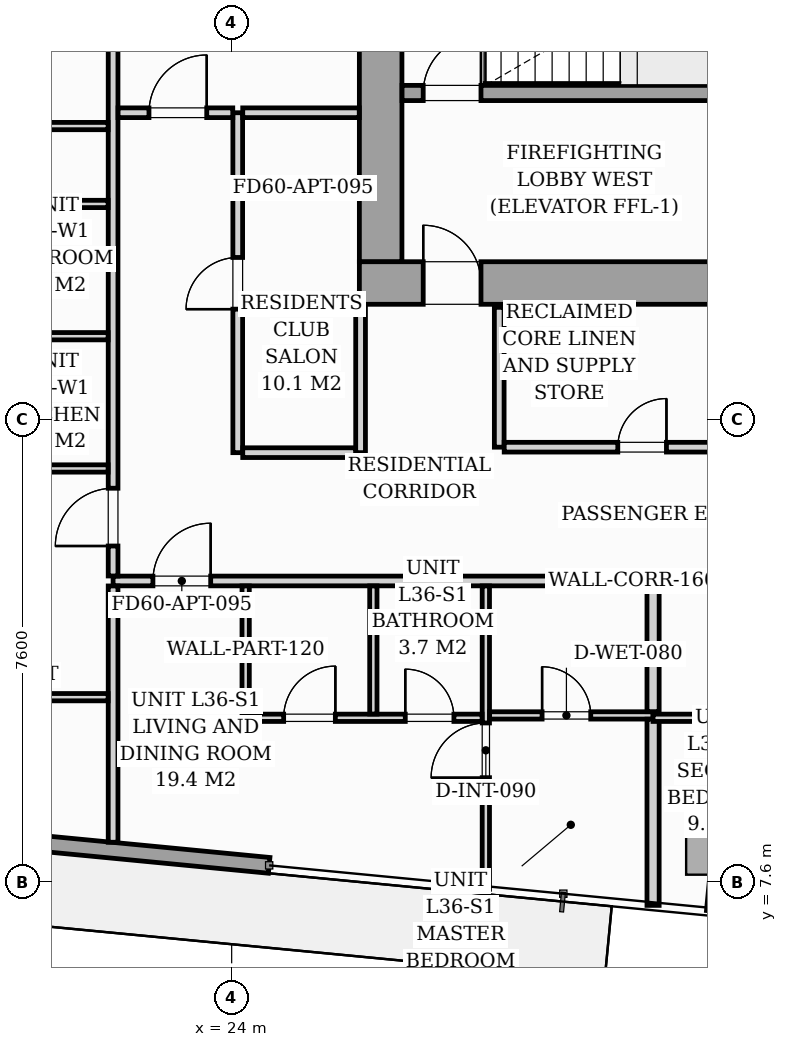
"""IFC4 building model, lengths in metres.
Left out: names, types, materials, properties, quantities, classifications, styles, units other than length and angle.
Written with IfcOpenShell. Run it as: python <this file> out.ifc"""

import sys

from ifc_helpers import new_model, si_unit, direction, frame, frame_2d, origin, origin_2d, place, context, subcontext, project, spatial, rectangle, i_section, extrude, source, transform, mapped, element, fill, save


model = new_model("IFC4")
c1 = context("Model", 3, precision=1e-05, world=origin(), true_north=direction((0.0, 1.0)))
c2 = subcontext(c1, "Body", "Model", "MODEL_VIEW")
j1 = project(units=[si_unit("LENGTHUNIT", "METRE"), si_unit("PLANEANGLEUNIT", "RADIAN")], contexts=[c1])
p1 = place(None, origin())
s1 = spatial("IfcSite", under=j1, at=p1, CompositionType="ELEMENT")
p2 = place(p1, origin())
s2 = spatial("IfcBuilding", under=s1, at=p2, CompositionType="ELEMENT")
p3 = place(p2, frame((0.0, 0.0, 127.8)))
s3 = spatial("IfcBuildingStorey", under=s2, at=p3, CompositionType="ELEMENT", Elevation=127.8)
m1 = source(origin(), c2, "Body", "SweptSolid", [
    extrude(i_section(OverallWidth=0.421, OverallDepth=0.465, WebThickness=0.045, FlangeThickness=0.073, FilletRadius=0.018, at=origin_2d()), origin(), (0.0, 0.0, 1.0), 3.196),
])
p4 = place(p3, frame((26.4, 17.4, 0.002), z_axis=(0.0, 0.0, 1.0), x_axis=(1.0, 0.0, 0.0)))
e1 = element("IfcColumn", 1, at=p4, inside=s3, PredefinedType="PILASTER", context=c2, shape_type="MappedRepresentation", body=[
    mapped(m1, transform((0.0, 0.0, 0.0), scale=1.0)),
])
m2 = source(origin(), c2, "Body", "SweptSolid", [
    extrude(rectangle(XDim=1.0, YDim=1.0, at=origin_2d()), origin(), (0.0, 0.0, 1.0), 3.196),
])
p5 = place(p3, frame((31.974, 8.22, 0.002), z_axis=(0.0, 0.0, 1.0), x_axis=(0.995396198367, -0.09584575252, 0.0)))
e2 = element("IfcColumn", 2, at=p5, inside=s3, PredefinedType="COLUMN", context=c2, shape_type="MappedRepresentation", body=[
    mapped(m2, transform((0.0, 0.0, 0.0), scale=1.0)),
])
p6 = place(p3, frame((24.617, 7.873, 0.0), z_axis=(0.0, 0.0, 1.0), x_axis=(-0.995395976631, 0.095848055311, 0.0)))
e3 = element("IfcWall", 3, at=p6, inside=s3, PredefinedType="STANDARD", context=c2, shape_type="SweptSolid", body=[
    extrude(rectangle(XDim=17.01, YDim=0.26, at=frame_2d((8.505, 0.0))), origin(), (0.0, 0.0, 1.0), 2.94),
])
p7 = place(p6, frame((6.51, 0.0, 0.0)))
e4 = element("IfcOpeningElement", 4, at=p7, cuts=e3, PredefinedType="OPENING", context=c2, shape_type="SweptSolid", body=[
    extrude(rectangle(XDim=1.8, YDim=2.06, at=frame_2d((0.9, 1.03))), frame((0.0, 0.14, 0.0), z_axis=(0.0, -1.0, 0.0), x_axis=(1.0, 0.0, 0.0)), (0.0, 0.0, 1.0), 0.28),
])
p8 = place(p6, frame((8.8, 0.0, 0.65)))
e5 = element("IfcOpeningElement", 5, at=p8, cuts=e3, PredefinedType="OPENING", context=c2, shape_type="SweptSolid", body=[
    extrude(rectangle(XDim=1.6, YDim=1.5, at=frame_2d((0.8, 0.75))), frame((0.0, 0.14, 0.0), z_axis=(0.0, -1.0, 0.0), x_axis=(1.0, 0.0, 0.0)), (0.0, 0.0, 1.0), 0.28),
])
p9 = place(p3, frame((26.1, 17.45, 0.0), z_axis=(0.0, 0.0, 1.0), x_axis=(1.0, 0.0, 0.0)))
e6 = element("IfcWall", 6, at=p9, inside=s3, PredefinedType="SHEAR", context=c2, shape_type="SweptSolid", body=[
    extrude(rectangle(XDim=19.8, YDim=0.7, at=frame_2d((9.9, 0.0))), origin(), (0.0, 0.0, 1.0), 3.2),
])
p10 = place(p9, frame((1.05, 0.0, 0.0)))
e7 = element("IfcOpeningElement", 7, at=p10, cuts=e6, PredefinedType="OPENING", context=c2, shape_type="SweptSolid", body=[
    extrude(rectangle(XDim=0.95, YDim=2.06, at=frame_2d((0.475, 1.03))), frame((0.0, 0.36, 0.0), z_axis=(0.0, -1.0, 0.0), x_axis=(1.0, 0.0, 0.0)), (0.0, 0.0, 1.0), 0.72),
])
p11 = place(p9, frame((9.48, 0.0, 0.0)))
e8 = element("IfcOpeningElement", 8, at=p11, cuts=e6, PredefinedType="OPENING", context=c2, shape_type="SweptSolid", body=[
    extrude(rectangle(XDim=0.85, YDim=2.0, at=frame_2d((0.425, 1.0))), frame((0.0, 0.36, 0.0), z_axis=(0.0, -1.0, 0.0), x_axis=(1.0, 0.0, 0.0)), (0.0, 0.0, 1.0), 0.72),
])
p12 = place(p9, frame((17.65, 0.0, 0.0)))
e9 = element("IfcOpeningElement", 9, at=p12, cuts=e6, PredefinedType="OPENING", context=c2, shape_type="SweptSolid", body=[
    extrude(rectangle(XDim=0.95, YDim=2.06, at=frame_2d((0.475, 1.03))), frame((0.0, 0.36, 0.0), z_axis=(0.0, -1.0, 0.0), x_axis=(1.0, 0.0, 0.0)), (0.0, 0.0, 1.0), 0.72),
])
p13 = place(p3, frame((26.45, 17.802, 0.0), z_axis=(0.0, 0.0, 1.0), x_axis=(0.0, 1.0, 0.0)))
e10 = element("IfcWall", 10, at=p13, inside=s3, PredefinedType="SHEAR", context=c2, shape_type="SweptSolid", body=[
    extrude(rectangle(XDim=5.796, YDim=0.7, at=frame_2d((2.898, 0.0))), origin(), (0.0, 0.0, 1.0), 3.2),
])
p14 = place(p3, frame((26.802, 20.575, 0.0), z_axis=(0.0, 0.0, 1.0), x_axis=(1.0, 0.0, 0.0)))
e11 = element("IfcWall", 11, at=p14, inside=s3, PredefinedType="SOLIDWALL", context=c2, shape_type="SweptSolid", body=[
    extrude(rectangle(XDim=8.148, YDim=0.25, at=frame_2d((4.074, 0.0))), origin(), (0.0, 0.0, 1.0), 3.2),
])
p15 = place(p14, frame((0.348, 0.0, 0.0)))
e12 = element("IfcOpeningElement", 12, at=p15, cuts=e11, PredefinedType="OPENING", context=c2, shape_type="SweptSolid", body=[
    extrude(rectangle(XDim=0.95, YDim=2.06, at=frame_2d((0.475, 1.03))), frame((0.0, 0.135, 0.0), z_axis=(0.0, -1.0, 0.0), x_axis=(1.0, 0.0, 0.0)), (0.0, 0.0, 1.0), 0.27),
])
p16 = place(p3, frame((28.4, 14.75, 0.0), z_axis=(0.0, 0.0, 1.0), x_axis=(0.0, 1.0, 0.0)))
e13 = element("IfcWall", 13, at=p16, inside=s3, PredefinedType="PARTITIONING", context=c2, shape_type="SweptSolid", body=[
    extrude(rectangle(XDim=2.3, YDim=0.16, at=frame_2d((1.15, 0.0))), origin(), (0.0, 0.0, 1.0), 2.94),
])
p17 = place(p3, frame((28.482, 14.75, 0.0), z_axis=(0.0, 0.0, 1.0), x_axis=(1.0, 0.0, 0.0)))
e14 = element("IfcWall", 14, at=p17, inside=s3, PredefinedType="PARTITIONING", context=c2, shape_type="SweptSolid", body=[
    extrude(rectangle(XDim=4.516, YDim=0.16, at=frame_2d((2.258, 0.0))), origin(), (0.0, 0.0, 1.0), 2.94),
])
p18 = place(p17, frame((1.868, 0.0, 0.0)))
e15 = element("IfcOpeningElement", 15, at=p18, cuts=e14, PredefinedType="OPENING", context=c2, shape_type="SweptSolid", body=[
    extrude(rectangle(XDim=0.8, YDim=2.05, at=frame_2d((0.4, 1.025))), frame((0.0, 0.09, 0.0), z_axis=(0.0, -1.0, 0.0), x_axis=(1.0, 0.0, 0.0)), (0.0, 0.0, 1.0), 0.18),
])
p19 = place(p3, frame((22.05, 12.55, 0.0), z_axis=(0.0, 0.0, 1.0), x_axis=(1.0, 0.0, 0.0)))
e16 = element("IfcWall", 16, at=p19, inside=s3, PredefinedType="PARTITIONING", context=c2, shape_type="SweptSolid", body=[
    extrude(rectangle(XDim=23.83, YDim=0.16, at=frame_2d((11.915, 0.0))), origin(), (0.0, 0.0, 1.0), 2.94),
])
p20 = place(p19, frame((0.655, 0.0, 0.0)))
e17 = element("IfcOpeningElement", 17, at=p20, cuts=e16, PredefinedType="OPENING", context=c2, shape_type="SweptSolid", body=[
    extrude(rectangle(XDim=0.95, YDim=2.06, at=frame_2d((0.475, 1.03))), frame((0.0, 0.09, 0.0), z_axis=(0.0, -1.0, 0.0), x_axis=(1.0, 0.0, 0.0)), (0.0, 0.0, 1.0), 0.18),
])
p21 = place(p19, frame((12.04, 0.0, 0.0)))
e18 = element("IfcOpeningElement", 18, at=p21, cuts=e16, PredefinedType="OPENING", context=c2, shape_type="SweptSolid", body=[
    extrude(rectangle(XDim=0.95, YDim=2.06, at=frame_2d((0.475, 1.03))), frame((0.0, 0.09, 0.0), z_axis=(0.0, -1.0, 0.0), x_axis=(1.0, 0.0, 0.0)), (0.0, 0.0, 1.0), 0.18),
])
p22 = place(p3, frame((22.05, 8.253, 0.0), z_axis=(0.0, 0.0, 1.0), x_axis=(0.0, 1.0, 0.0)))
e19 = element("IfcWall", 19, at=p22, inside=s3, PredefinedType="PARTITIONING", context=c2, shape_type="SweptSolid", body=[
    extrude(rectangle(XDim=4.215, YDim=0.16, at=frame_2d((2.107, 0.0))), origin(), (0.0, 0.0, 1.0), 2.94),
])
p23 = place(p3, frame((22.05, 12.632, 0.0), z_axis=(0.0, 0.0, 1.0), x_axis=(0.0, 1.0, 0.0)))
e20 = element("IfcWall", 20, at=p23, inside=s3, PredefinedType="PARTITIONING", context=c2, shape_type="SweptSolid", body=[
    extrude(rectangle(XDim=14.785, YDim=0.16, at=frame_2d((7.393, 0.0))), origin(), (0.0, 0.0, 1.0), 2.94),
])
p24 = place(p23, frame((0.493, 0.0, 0.0)))
e21 = element("IfcOpeningElement", 21, at=p24, cuts=e20, PredefinedType="OPENING", context=c2, shape_type="SweptSolid", body=[
    extrude(rectangle(XDim=0.95, YDim=2.06, at=frame_2d((0.475, 1.03))), frame((0.0, 0.09, 0.0), z_axis=(0.0, -1.0, 0.0), x_axis=(1.0, 0.0, 0.0)), (0.0, 0.0, 1.0), 0.18),
])
p25 = place(p3, frame((28.18, 7.48, 0.0), z_axis=(0.0, 0.0, 1.0), x_axis=(0.0, 1.0, 0.0)))
e22 = element("IfcWall", 22, at=p25, inside=s3, PredefinedType="PARTITIONING", context=c2, shape_type="SweptSolid", body=[
    extrude(rectangle(XDim=4.988, YDim=0.12, at=frame_2d((2.494, 0.0))), origin(), (0.0, 0.0, 1.0), 2.94),
])
p26 = place(p25, frame((1.835, 0.0, 0.0)))
e23 = element("IfcOpeningElement", 23, at=p26, cuts=e22, PredefinedType="OPENING", context=c2, shape_type="SweptSolid", body=[
    extrude(rectangle(XDim=0.9, YDim=2.05, at=frame_2d((0.45, 1.025))), frame((0.0, 0.07, 0.0), z_axis=(0.0, -1.0, 0.0), x_axis=(1.0, 0.0, 0.0)), (0.0, 0.0, 1.0), 0.14),
])
p27 = place(p3, frame((24.23, 10.3, 0.0), z_axis=(0.0, 0.0, 1.0), x_axis=(1.0, 0.0, 0.0)))
e24 = element("IfcWall", 24, at=p27, inside=s3, PredefinedType="PARTITIONING", context=c2, shape_type="SweptSolid", body=[
    extrude(rectangle(XDim=3.888, YDim=0.12, at=frame_2d((1.944, 0.0))), origin(), (0.0, 0.0, 1.0), 2.94),
])
p28 = place(p27, frame((0.625, 0.0, 0.0)))
e25 = element("IfcOpeningElement", 25, at=p28, cuts=e24, PredefinedType="OPENING", context=c2, shape_type="SweptSolid", body=[
    extrude(rectangle(XDim=0.85, YDim=2.05, at=frame_2d((0.425, 1.025))), frame((0.0, 0.07, 0.0), z_axis=(0.0, -1.0, 0.0), x_axis=(1.0, 0.0, 0.0)), (0.0, 0.0, 1.0), 0.14),
])
p29 = place(p27, frame((2.625, 0.0, 0.0)))
e26 = element("IfcOpeningElement", 26, at=p29, cuts=e24, PredefinedType="OPENING", context=c2, shape_type="SweptSolid", body=[
    extrude(rectangle(XDim=0.8, YDim=2.02, at=frame_2d((0.4, 1.01))), frame((0.0, 0.07, 0.0), z_axis=(0.0, -1.0, 0.0), x_axis=(1.0, 0.0, 0.0)), (0.0, 0.0, 1.0), 0.14),
])
for number, where, z_axis, x_axis in (
    (27, (26.33, 10.362, 0.0), (0.0, 0.0, 1.0), (0.0, 1.0, 0.0)),
    (28, (24.23, 10.362, 0.0), (0.0, 0.0, 1.0), (0.0, 1.0, 0.0)),
):
    element("IfcWall", number, at=place(p3, frame(where, z_axis=z_axis, x_axis=x_axis)), inside=s3, PredefinedType="PARTITIONING", context=c2, shape_type="SweptSolid", body=[
        extrude(rectangle(XDim=2.106, YDim=0.12, at=frame_2d((1.053, 0.0))), origin(), (0.0, 0.0, 1.0), 2.94),
    ])
p30 = place(p3, frame((28.242, 10.339, 0.0), z_axis=(0.0, 0.0, 1.0), x_axis=(1.0, 0.0, 0.0)))
e29 = element("IfcWall", 29, at=p30, inside=s3, PredefinedType="PARTITIONING", context=c2, shape_type="SweptSolid", body=[
    extrude(rectangle(XDim=2.688, YDim=0.12, at=frame_2d((1.344, 0.0))), origin(), (0.0, 0.0, 1.0), 2.94),
])
p31 = place(p30, frame((0.863, 0.0, 0.0)))
e30 = element("IfcOpeningElement", 30, at=p31, cuts=e29, PredefinedType="OPENING", context=c2, shape_type="SweptSolid", body=[
    extrude(rectangle(XDim=0.8, YDim=2.02, at=frame_2d((0.4, 1.01))), frame((0.0, 0.07, 0.0), z_axis=(0.0, -1.0, 0.0), x_axis=(1.0, 0.0, 0.0)), (0.0, 0.0, 1.0), 0.14),
])
p32 = place(p3, frame((30.93, 7.215, 0.0), z_axis=(0.0, 0.0, 1.0), x_axis=(0.0, 1.0, 0.0)))
e31 = element("IfcWall", 31, at=p32, inside=s3, PredefinedType="PARTITIONING", context=c2, shape_type="SweptSolid", body=[
    extrude(rectangle(XDim=3.062, YDim=0.2, at=frame_2d((1.531, 0.0))), origin(), (0.0, 0.0, 1.0), 2.94),
])
p33 = place(p3, frame((30.93, 10.401, 0.0), z_axis=(0.0, 0.0, 1.0), x_axis=(0.0, 1.0, 0.0)))
e32 = element("IfcWall", 32, at=p33, inside=s3, PredefinedType="PARTITIONING", context=c2, shape_type="SweptSolid", body=[
    extrude(rectangle(XDim=2.067, YDim=0.2, at=frame_2d((1.034, 0.0))), origin(), (0.0, 0.0, 1.0), 2.94),
])
p34 = place(p3, frame((30.93, 10.3, 0.0), z_axis=(0.0, 0.0, 1.0), x_axis=(1.0, 0.0, 0.0)))
e33 = element("IfcWall", 33, at=p34, inside=s3, PredefinedType="PARTITIONING", context=c2, shape_type="SweptSolid", body=[
    extrude(rectangle(XDim=3.149, YDim=0.12, at=frame_2d((1.575, 0.0))), origin(), (0.0, 0.0, 1.0), 2.94),
])
for number, where, z_axis, x_axis in (
    (34, (19.712, 16.575, 0.0), (0.0, 0.0, 1.0), (1.0, 0.0, 0.0)),
    (35, (19.712, 14.4, 0.0), (0.0, 0.0, 1.0), (1.0, 0.0, 0.0)),
    (36, (19.712, 18.75, 0.0), (0.0, 0.0, 1.0), (1.0, 0.0, 0.0)),
):
    element("IfcWall", number, at=place(p3, frame(where, z_axis=z_axis, x_axis=x_axis)), inside=s3, PredefinedType="PARTITIONING", context=c2, shape_type="SweptSolid", body=[
        extrude(rectangle(XDim=2.256, YDim=0.12, at=frame_2d((1.128, 0.0))), origin(), (0.0, 0.0, 1.0), 2.94),
    ])
p35 = place(p3, frame((8.395, 10.639, 0.0), z_axis=(0.0, 0.0, 1.0), x_axis=(1.0, 0.0, 0.0)))
e37 = element("IfcWall", 37, at=p35, inside=s3, PredefinedType="PARTITIONING", context=c2, shape_type="SweptSolid", body=[
    extrude(rectangle(XDim=13.573, YDim=0.12, at=frame_2d((6.787, 0.0))), origin(), (0.0, 0.0, 1.0), 2.94),
])
p36 = place(p35, frame((7.451, 0.0, 0.0)))
e38 = element("IfcOpeningElement", 38, at=p36, cuts=e37, PredefinedType="OPENING", context=c2, shape_type="SweptSolid", body=[
    extrude(rectangle(XDim=0.85, YDim=2.05, at=frame_2d((0.425, 1.025))), frame((0.0, 0.07, 0.0), z_axis=(0.0, -1.0, 0.0), x_axis=(1.0, 0.0, 0.0)), (0.0, 0.0, 1.0), 0.14),
])
p37 = place(p3, frame((6.268, 20.031, 0.0), z_axis=(0.0, 0.0, 1.0), x_axis=(1.0, 0.0, 0.0)))
e39 = element("IfcWall", 39, at=p37, inside=s3, PredefinedType="PARTITIONING", context=c2, shape_type="SweptSolid", body=[
    extrude(rectangle(XDim=15.7, YDim=0.12, at=frame_2d((7.85, 0.0))), origin(), (0.0, 0.0, 1.0), 2.94),
])
p38 = place(p37, frame((9.579, 0.0, 0.0)))
e40 = element("IfcOpeningElement", 40, at=p38, cuts=e39, PredefinedType="OPENING", context=c2, shape_type="SweptSolid", body=[
    extrude(rectangle(XDim=0.85, YDim=2.05, at=frame_2d((0.425, 1.025))), frame((0.0, 0.07, 0.0), z_axis=(0.0, -1.0, 0.0), x_axis=(1.0, 0.0, 0.0)), (0.0, 0.0, 1.0), 0.14),
])
p39 = place(p3, frame((24.1, 14.66, 0.0), z_axis=(0.0, 0.0, 1.0), x_axis=(0.0, 1.0, 0.0)))
e41 = element("IfcWall", 41, at=p39, inside=s3, PredefinedType="PARTITIONING", context=c2, shape_type="SweptSolid", body=[
    extrude(rectangle(XDim=5.59, YDim=0.16, at=frame_2d((2.795, 0.0))), origin(), (0.0, 0.0, 1.0), 2.94),
])
p40 = place(p39, frame((2.36, 0.0, 0.0)))
e42 = element("IfcOpeningElement", 42, at=p40, cuts=e41, PredefinedType="OPENING", context=c2, shape_type="SweptSolid", body=[
    extrude(rectangle(XDim=0.85, YDim=2.0, at=frame_2d((0.425, 1.0))), frame((0.0, 0.09, 0.0), z_axis=(0.0, -1.0, 0.0), x_axis=(1.0, 0.0, 0.0)), (0.0, 0.0, 1.0), 0.18),
])
p41 = place(p3, frame((22.132, 20.25, 0.0), z_axis=(0.0, 0.0, 1.0), x_axis=(1.0, 0.0, 0.0)))
e43 = element("IfcWall", 43, at=p41, inside=s3, PredefinedType="PARTITIONING", context=c2, shape_type="SweptSolid", body=[
    extrude(rectangle(XDim=1.886, YDim=0.16, at=frame_2d((0.943, 0.0))), origin(), (0.0, 0.0, 1.0), 2.94),
])
p42 = place(p41, frame((0.508, 0.0, 0.0)))
e44 = element("IfcOpeningElement", 44, at=p42, cuts=e43, PredefinedType="OPENING", context=c2, shape_type="SweptSolid", body=[
    extrude(rectangle(XDim=0.95, YDim=2.06, at=frame_2d((0.475, 1.03))), frame((0.0, 0.09, 0.0), z_axis=(0.0, -1.0, 0.0), x_axis=(1.0, 0.0, 0.0)), (0.0, 0.0, 1.0), 0.18),
])
p43 = place(p3, frame((24.182, 20.25, 0.0), z_axis=(0.0, 0.0, 1.0), x_axis=(1.0, 0.0, 0.0)))
e45 = element("IfcWall", 45, at=p43, inside=s3, PredefinedType="PARTITIONING", context=c2, shape_type="SweptSolid", body=[
    extrude(rectangle(XDim=1.916, YDim=0.16, at=frame_2d((0.958, 0.0))), origin(), (0.0, 0.0, 1.0), 2.94),
])
p44 = place(p3, frame((26.12, 14.66, 0.0), z_axis=(0.0, 0.0, 1.0), x_axis=(0.0, 1.0, 0.0)))
e46 = element("IfcWall", 46, at=p44, inside=s3, PredefinedType="PARTITIONING", context=c2, shape_type="SweptSolid", body=[
    extrude(rectangle(XDim=2.438, YDim=0.16, at=frame_2d((1.219, 0.0))), origin(), (0.0, 0.0, 1.0), 2.94),
])
p45 = place(p3, frame((24.182, 14.66, 0.0), z_axis=(0.0, 0.0, 1.0), x_axis=(1.0, 0.0, 0.0)))
e47 = element("IfcWall", 47, at=p45, inside=s3, PredefinedType="PARTITIONING", context=c2, shape_type="SweptSolid", body=[
    extrude(rectangle(XDim=1.856, YDim=0.16, at=frame_2d((0.928, 0.0))), origin(), (0.0, 0.0, 1.0), 2.94),
])
p46 = place(p3, frame((31.938, 7.841, 0.0), z_axis=(0.0, 0.0, 1.0), x_axis=(-0.095977354523, -0.995383517755, 0.0)))
e48 = element("IfcWall", 48, at=p46, inside=s3, PredefinedType="PARTITIONING", context=c2, shape_type="SweptSolid", body=[
    extrude(rectangle(XDim=0.72, YDim=0.12, at=frame_2d((0.36, 0.0))), origin(), (0.0, 0.0, 1.0), 2.94),
])
m3 = source(origin(), c2, "Body", "SweptSolid", [
    extrude(rectangle(XDim=0.95, YDim=2.06, at=frame_2d((0.475, 1.03))), frame((0.0, 0.025, 0.0), z_axis=(0.0, -1.0, 0.0), x_axis=(1.0, 0.0, 0.0)), (0.0, 0.0, 1.0), 0.05),
])
p47 = place(p10, origin())
e49 = element("IfcDoor", 49, at=p47, inside=s3, OperationType="SINGLE_SWING_LEFT", PredefinedType="DOOR", context=c2, shape_type="MappedRepresentation", body=[
    mapped(m3, transform((0.0, 0.0, 0.0), scale=1.0)),
])
fill(e7, e49)
p48 = place(p15, origin())
e50 = element("IfcDoor", 50, at=p48, inside=s3, OperationType="SINGLE_SWING_RIGHT", PredefinedType="DOOR", context=c2, shape_type="MappedRepresentation", body=[
    mapped(m3, transform((0.0, 0.0, 0.0), scale=1.0)),
])
fill(e12, e50)
m4 = source(origin(), c2, "Body", "SweptSolid", [
    extrude(rectangle(XDim=0.8, YDim=2.05, at=frame_2d((0.4, 1.025))), frame((0.0, 0.025, 0.0), z_axis=(0.0, -1.0, 0.0), x_axis=(1.0, 0.0, 0.0)), (0.0, 0.0, 1.0), 0.05),
])
p49 = place(p18, origin())
e51 = element("IfcDoor", 51, at=p49, inside=s3, OperationType="SINGLE_SWING_RIGHT", PredefinedType="DOOR", context=c2, shape_type="MappedRepresentation", body=[
    mapped(m4, transform((0.0, 0.0, 0.0), scale=1.0)),
])
fill(e15, e51)
m5 = source(origin(), c2, "Body", "SweptSolid", [
    extrude(rectangle(XDim=0.8, YDim=2.02, at=frame_2d((0.4, 1.01))), frame((0.0, 0.025, 0.0), z_axis=(0.0, -1.0, 0.0), x_axis=(1.0, 0.0, 0.0)), (0.0, 0.0, 1.0), 0.05),
])
p50 = place(p31, origin())
e52 = element("IfcDoor", 52, at=p50, inside=s3, OperationType="SINGLE_SWING_LEFT", PredefinedType="DOOR", context=c2, shape_type="MappedRepresentation", body=[
    mapped(m5, transform((0.0, 0.0, 0.0), scale=1.0)),
])
fill(e30, e52)
m6 = source(origin(), c2, "Body", "SweptSolid", [
    extrude(rectangle(XDim=0.95, YDim=2.06, at=frame_2d((0.475, 1.03))), frame((0.0, 0.025, 0.0), z_axis=(0.0, -1.0, 0.0), x_axis=(1.0, 0.0, 0.0)), (0.0, 0.0, 1.0), 0.05),
])
p51 = place(p20, origin())
e53 = element("IfcDoor", 53, at=p51, inside=s3, OperationType="SINGLE_SWING_RIGHT", PredefinedType="DOOR", context=c2, shape_type="MappedRepresentation", body=[
    mapped(m6, transform((0.0, 0.0, 0.0), scale=1.0)),
])
fill(e17, e53)
m7 = source(origin(), c2, "Body", "SweptSolid", [
    extrude(rectangle(XDim=0.9, YDim=2.05, at=frame_2d((0.45, 1.025))), frame((0.0, 0.025, 0.0), z_axis=(0.0, -1.0, 0.0), x_axis=(1.0, 0.0, 0.0)), (0.0, 0.0, 1.0), 0.05),
])
p52 = place(p26, origin())
e54 = element("IfcDoor", 54, at=p52, inside=s3, OperationType="SINGLE_SWING_LEFT", PredefinedType="DOOR", context=c2, shape_type="MappedRepresentation", body=[
    mapped(m7, transform((0.0, 0.0, 0.0), scale=1.0)),
])
fill(e23, e54)
m8 = source(origin(), c2, "Body", "SweptSolid", [
    extrude(rectangle(XDim=0.85, YDim=2.05, at=frame_2d((0.425, 1.025))), frame((0.0, 0.025, 0.0), z_axis=(0.0, -1.0, 0.0), x_axis=(1.0, 0.0, 0.0)), (0.0, 0.0, 1.0), 0.05),
])
p53 = place(p28, origin())
e55 = element("IfcDoor", 55, at=p53, inside=s3, OperationType="SINGLE_SWING_RIGHT", PredefinedType="DOOR", context=c2, shape_type="MappedRepresentation", body=[
    mapped(m8, transform((0.0, 0.0, 0.0), scale=1.0)),
])
fill(e25, e55)
p54 = place(p29, origin())
e56 = element("IfcDoor", 56, at=p54, inside=s3, OperationType="SINGLE_SWING_LEFT", PredefinedType="DOOR", context=c2, shape_type="MappedRepresentation", body=[
    mapped(m5, transform((0.0, 0.0, 0.0), scale=1.0)),
])
fill(e26, e56)
p55 = place(p24, origin())
e57 = element("IfcDoor", 57, at=p55, inside=s3, OperationType="SINGLE_SWING_LEFT", PredefinedType="DOOR", context=c2, shape_type="MappedRepresentation", body=[
    mapped(m6, transform((0.0, 0.0, 0.0), scale=1.0)),
])
fill(e21, e57)
m9 = source(origin(), c2, "Body", "SweptSolid", [
    extrude(rectangle(XDim=0.85, YDim=2.0, at=frame_2d((0.425, 1.0))), frame((0.0, 0.025, 0.0), z_axis=(0.0, -1.0, 0.0), x_axis=(1.0, 0.0, 0.0)), (0.0, 0.0, 1.0), 0.05),
])
p56 = place(p40, origin())
e58 = element("IfcDoor", 58, at=p56, inside=s3, OperationType="SINGLE_SWING_LEFT", PredefinedType="DOOR", context=c2, shape_type="MappedRepresentation", body=[
    mapped(m9, transform((0.0, 0.0, 0.0), scale=1.0)),
])
fill(e42, e58)
p57 = place(p42, origin())
e59 = element("IfcDoor", 59, at=p57, inside=s3, OperationType="SINGLE_SWING_RIGHT", PredefinedType="DOOR", context=c2, shape_type="MappedRepresentation", body=[
    mapped(m6, transform((0.0, 0.0, 0.0), scale=1.0)),
])
fill(e44, e59)
save(model, sys.argv[1])
